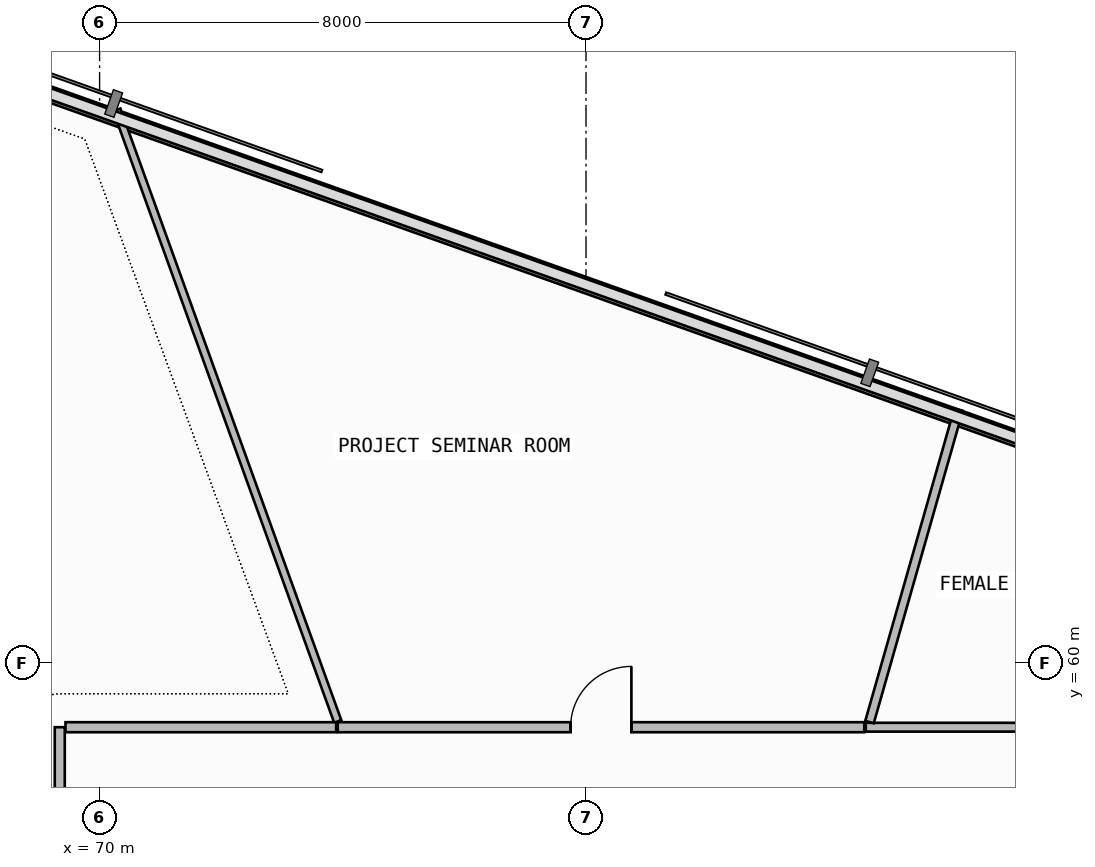
"""IFC4 building model, lengths in metres.
Left out: names, types, materials, properties, quantities, classifications, styles, units other than length and angle.
Written with IfcOpenShell. Run it as: python <this file> out.ifc"""

import sys

from ifc_helpers import new_model, si_unit, direction, frame, frame_2d, origin, place, context, subcontext, project, spatial, rectangle, extrude, element, fill, save


model = new_model("IFC4")
c1 = context("Model", 3, precision=1e-05, world=origin(), true_north=direction((0.0, 1.0)))
c2 = subcontext(c1, "Body", "Model", "MODEL_VIEW")
j1 = project(units=[si_unit("LENGTHUNIT", "METRE"), si_unit("PLANEANGLEUNIT", "RADIAN")], contexts=[c1])
p1 = place(None, origin())
s1 = spatial("IfcSite", under=j1, at=p1, CompositionType="ELEMENT")
p2 = place(p1, origin())
s2 = spatial("IfcBuilding", under=s1, at=p2, CompositionType="ELEMENT")
p3 = place(p2, frame((0.0, 0.0, 143.1)))
s3 = spatial("IfcBuildingStorey", under=s2, at=p3, CompositionType="ELEMENT", Elevation=143.1)
p4 = place(p3, frame((89.368, 62.13, 0.0), z_axis=(0.0, 0.0, 1.0), x_axis=(-0.942033439765, 0.335518998515, 0.0)))
e1 = element("IfcWall", 1, at=p4, inside=s3, PredefinedType="PARAPET", context=c2, shape_type="SweptSolid", body=[
    extrude(rectangle(XDim=27.969, YDim=0.2, at=frame_2d((13.985, 0.0))), origin(), (0.0, 0.0, 1.0), 1.15),
])
p5 = place(p3, frame((94.105, 58.944, 0.0), z_axis=(0.0, 0.0, 1.0), x_axis=(-1.0, 0.0, 0.0)))
e2 = element("IfcWall", 2, at=p5, inside=s3, PredefinedType="PARTITIONING", context=c2, shape_type="SweptSolid", body=[
    extrude(rectangle(XDim=11.504, YDim=0.145, at=frame_2d((5.752, 0.0))), origin(), (0.0, 0.0, 1.0), 2.725),
])
p6 = place(p5, frame((5.302, 0.0, 0.0)))
e3 = element("IfcOpeningElement", 3, at=p6, cuts=e2, PredefinedType="OPENING", context=c2, shape_type="SweptSolid", body=[
    extrude(rectangle(XDim=0.9, YDim=2.1, at=frame_2d((0.45, 1.05))), frame((0.0, 0.083, 0.0), z_axis=(0.0, -1.0, 0.0), x_axis=(1.0, 0.0, 0.0)), (0.0, 0.0, 1.0), 0.165),
])
p7 = place(p3, frame((82.663, 59.029, 0.0), z_axis=(0.0, 0.0, 1.0), x_axis=(0.274027024553, 0.961721991957, 0.0)))
e4 = element("IfcWall", 4, at=p7, inside=s3, PredefinedType="PARTITIONING", context=c2, shape_type="SweptSolid", body=[
    extrude(rectangle(XDim=5.343, YDim=0.145, at=frame_2d((2.671, 0.0))), origin(), (0.0, 0.0, 1.0), 3.34),
])
p8 = place(p3, frame((82.576, 58.944, 0.0), z_axis=(0.0, 0.0, 1.0), x_axis=(-1.0, 0.0, 0.0)))
e5 = element("IfcWall", 5, at=p8, inside=s3, PredefinedType="PARTITIONING", context=c2, shape_type="SweptSolid", body=[
    extrude(rectangle(XDim=8.66, YDim=0.165, at=frame_2d((4.33, 0.0))), origin(), (0.0, 0.0, 1.0), 3.34),
])
p9 = place(p8, frame((3.83, 0.0, 0.0)))
e6 = element("IfcOpeningElement", 6, at=p9, cuts=e5, PredefinedType="OPENING", context=c2, shape_type="SweptSolid", body=[
    extrude(rectangle(XDim=1.0, YDim=2.2, at=frame_2d((0.5, 1.1))), frame((0.0, 0.093, 0.0), z_axis=(0.0, -1.0, 0.0), x_axis=(1.0, 0.0, 0.0)), (0.0, 0.0, 1.0), 0.185),
])
p10 = place(p3, frame((73.917, 59.039, 0.0), z_axis=(0.0, 0.0, 1.0), x_axis=(-0.33969494852, 0.940535667559, 0.0)))
e7 = element("IfcWall", 7, at=p10, inside=s3, PredefinedType="PARTITIONING", context=c2, shape_type="SweptSolid", body=[
    extrude(rectangle(XDim=10.695, YDim=0.125, at=frame_2d((5.348, 0.0))), origin(), (0.0, 0.0, 1.0), 3.34),
])
p11 = place(p3, frame((69.345, 58.944, 0.0), z_axis=(0.0, 0.0, 1.0), x_axis=(0.0, -1.0, 0.0)))
e8 = element("IfcWall", 8, at=p11, inside=s3, PredefinedType="PARTITIONING", context=c2, shape_type="SweptSolid", body=[
    extrude(rectangle(XDim=6.988, YDim=0.165, at=frame_2d((3.494, 0.0))), origin(), (0.0, 0.0, 1.0), 2.725),
])
p12 = place(p11, frame((2.994, 0.0, 0.0)))
e9 = element("IfcOpeningElement", 9, at=p12, cuts=e8, PredefinedType="OPENING", context=c2, shape_type="SweptSolid", body=[
    extrude(rectangle(XDim=1.0, YDim=2.2, at=frame_2d((0.5, 1.1))), frame((0.0, 0.093, 0.0), z_axis=(0.0, -1.0, 0.0), x_axis=(1.0, 0.0, 0.0)), (0.0, 0.0, 1.0), 0.185),
])
p13 = place(p3, frame((73.891, 58.944, 0.0), z_axis=(0.0, 0.0, 1.0), x_axis=(-1.0, 0.0, 0.0)))
e10 = element("IfcWall", 10, at=p13, inside=s3, PredefinedType="PARTITIONING", context=c2, shape_type="SweptSolid", body=[
    extrude(rectangle(XDim=4.451, YDim=0.165, at=frame_2d((2.226, 0.0))), origin(), (0.0, 0.0, 1.0), 2.725),
])
p14 = place(p3, frame((69.25, 52.062, 0.0), z_axis=(0.0, 0.0, 1.0), x_axis=(-0.834214251914, 0.551440460887, 0.0)))
e11 = element("IfcWall", 11, at=p14, inside=s3, PredefinedType="PARTITIONING", context=c2, shape_type="SweptSolid", body=[
    extrude(rectangle(XDim=12.374, YDim=0.125, at=frame_2d((6.187, 0.0))), origin(), (0.0, 0.0, 1.0), 2.725),
])
p15 = place(p9, frame((1.0, 0.0, 0.0), z_axis=(0.0, 0.0, 1.0), x_axis=(-1.0, 0.0, 0.0)))
e12 = element("IfcDoor", 12, at=p15, inside=s3, OperationType="SINGLE_SWING_RIGHT", PredefinedType="DOOR", context=c2, shape_type="SweptSolid", body=[
    extrude(rectangle(XDim=1.0, YDim=2.2, at=frame_2d((0.5, 1.1))), frame((0.0, 0.025, 0.0), z_axis=(0.0, -1.0, 0.0), x_axis=(1.0, 0.0, 0.0)), (0.0, 0.0, 1.0), 0.05),
])
fill(e6, e12)
save(model, sys.argv[1])
